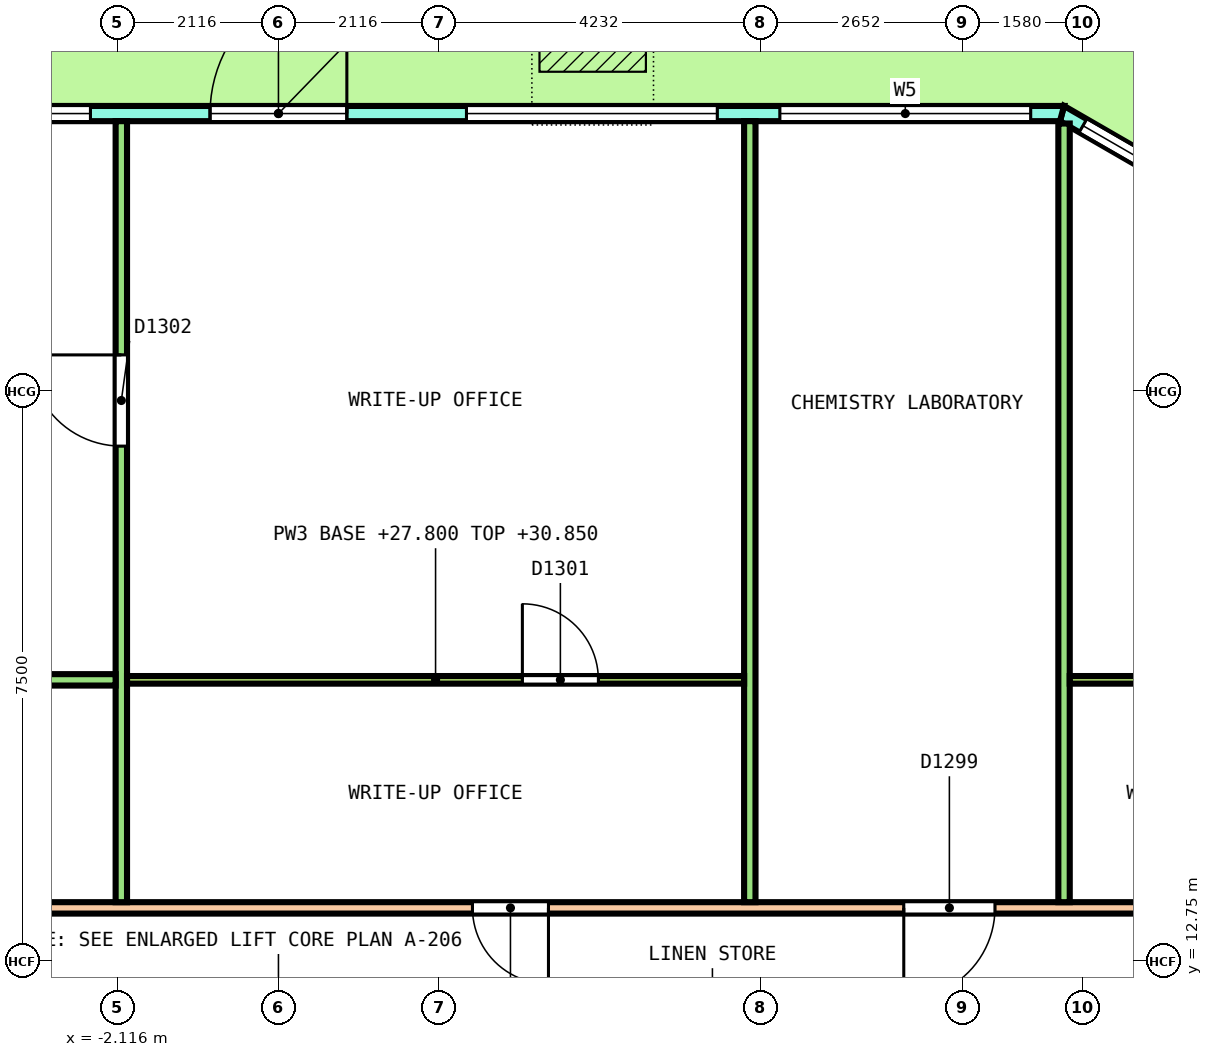
"""IFC4 building model, lengths in metres.
Left out: names, types, materials, properties, quantities, classifications, styles, units other than length and angle.
Written with IfcOpenShell. Run it as: python <this file> out.ifc"""

import sys

from ifc_helpers import new_model, si_unit, direction, frame, frame_2d, origin, place, context, subcontext, project, spatial, polyline, rectangle, outline, extrude, element, fill, save


model = new_model("IFC4")
c1 = context("Model", 3, precision=1e-05, world=origin(), true_north=direction((0.0, 1.0)))
c2 = subcontext(c1, "Body", "Model", "MODEL_VIEW")
j1 = project(units=[si_unit("LENGTHUNIT", "METRE"), si_unit("PLANEANGLEUNIT", "RADIAN")], contexts=[c1])
p1 = place(None, origin())
s1 = spatial("IfcSite", under=j1, at=p1, CompositionType="ELEMENT")
p2 = place(p1, origin())
s2 = spatial("IfcBuilding", under=s1, at=p2, CompositionType="ELEMENT")
p3 = place(p2, frame((0.0, 0.0, 27.8)))
s3 = spatial("IfcBuildingStorey", under=s2, at=p3, CompositionType="ELEMENT", Elevation=27.8)
p4 = place(p3, frame((16.262, 20.463, 0.0), z_axis=(0.0, 0.0, 1.0), x_axis=(-0.866029458321, 0.49999297727, 0.0)))
e1 = element("IfcWall", 1, at=p4, inside=s3, PredefinedType="SOLIDWALL", context=c2, shape_type="SweptSolid", body=[
    extrude(outline(polyline([(-0.027, -0.1), (1.128, -0.1), (2.282, -0.1), (3.437, -0.1), (4.592, -0.1), (5.747, -0.1), (6.901, -0.1), (6.848, 0.1), (5.711, 0.1), (4.574, 0.1), (3.437, 0.1), (2.301, 0.1), (1.164, 0.1), (0.027, 0.1), (-0.027, -0.1)])), origin(), (0.0, 0.0, 1.0), 4.1),
])
p5 = place(p4, frame((0.319, 0.0, 0.1)))
e2 = element("IfcOpeningElement", 2, at=p5, cuts=e1, PredefinedType="OPENING", context=c2, shape_type="SweptSolid", body=[
    extrude(rectangle(XDim=2.8, YDim=2.9, at=frame_2d((1.4, 1.45))), frame((0.0, 0.11, 0.0), z_axis=(0.0, -1.0, 0.0), x_axis=(1.0, 0.0, 0.0)), (0.0, 0.0, 1.0), 0.22),
])
p6 = place(p4, frame((3.756, 0.0, 0.1)))
e3 = element("IfcOpeningElement", 3, at=p6, cuts=e1, PredefinedType="OPENING", context=c2, shape_type="SweptSolid", body=[
    extrude(rectangle(XDim=2.8, YDim=2.9, at=frame_2d((1.4, 1.45))), frame((0.0, 0.11, 0.0), z_axis=(0.0, -1.0, 0.0), x_axis=(1.0, 0.0, 0.0)), (0.0, 0.0, 1.0), 0.22),
])
p7 = place(p3, frame((10.309, 23.9, 0.0), z_axis=(0.0, 0.0, 1.0), x_axis=(-1.0, 0.0, 0.0)))
e4 = element("IfcWall", 4, at=p7, inside=s3, PredefinedType="SOLIDWALL", context=c2, shape_type="SweptSolid", body=[
    extrude(outline(polyline([(-0.027, -0.1), (1.007, -0.1), (2.04, -0.1), (3.074, -0.1), (4.107, -0.1), (5.141, -0.1), (6.174, -0.1), (7.208, -0.1), (8.241, -0.1), (9.275, -0.1), (10.309, -0.1), (11.342, -0.1), (12.376, -0.1), (13.409, -0.1), (14.443, -0.1), (15.476, -0.1), (16.51, -0.1), (17.543, -0.1), (18.577, -0.1), (19.611, -0.1), (20.644, -0.1), (20.59, 0.1), (19.562, 0.1), (18.534, 0.1), (17.506, 0.1), (16.478, 0.1), (15.449, 0.1), (14.421, 0.1), (13.393, 0.1), (12.365, 0.1), (11.337, 0.1), (10.309, 0.1), (9.281, 0.1), (8.252, 0.1), (7.224, 0.1), (6.196, 0.1), (5.168, 0.1), (4.14, 0.1), (3.111, 0.1), (2.083, 0.1), (1.055, 0.1), (0.027, 0.1), (-0.027, -0.1)])), origin(), (0.0, 0.0, 1.0), 4.1),
])
p8 = place(p7, frame((0.412, 0.0, 0.1)))
e5 = element("IfcOpeningElement", 5, at=p8, cuts=e4, PredefinedType="OPENING", context=c2, shape_type="SweptSolid", body=[
    extrude(rectangle(XDim=3.3, YDim=2.9, at=frame_2d((1.65, 1.45))), frame((0.0, 0.11, 0.0), z_axis=(0.0, -1.0, 0.0), x_axis=(1.0, 0.0, 0.0)), (0.0, 0.0, 1.0), 0.22),
])
p9 = place(p7, frame((4.535, 0.0, 0.1)))
e6 = element("IfcOpeningElement", 6, at=p9, cuts=e4, PredefinedType="OPENING", context=c2, shape_type="SweptSolid", body=[
    extrude(rectangle(XDim=3.3, YDim=2.9, at=frame_2d((1.65, 1.45))), frame((0.0, 0.11, 0.0), z_axis=(0.0, -1.0, 0.0), x_axis=(1.0, 0.0, 0.0)), (0.0, 0.0, 1.0), 0.22),
])
p10 = place(p7, frame((9.409, 0.0, 0.0)))
e7 = element("IfcOpeningElement", 7, at=p10, cuts=e4, PredefinedType="OPENING", context=c2, shape_type="SweptSolid", body=[
    extrude(rectangle(XDim=1.8, YDim=2.4, at=frame_2d((0.9, 1.2))), frame((0.0, 0.11, 0.0), z_axis=(0.0, -1.0, 0.0), x_axis=(1.0, 0.0, 0.0)), (0.0, 0.0, 1.0), 0.22),
])
p11 = place(p7, frame((9.409, 0.0, 2.55)))
e8 = element("IfcOpeningElement", 8, at=p11, cuts=e4, PredefinedType="OPENING", context=c2, shape_type="SweptSolid", body=[
    extrude(rectangle(XDim=1.8, YDim=0.45, at=frame_2d((0.9, 0.225))), frame((0.0, 0.11, 0.0), z_axis=(0.0, -1.0, 0.0), x_axis=(1.0, 0.0, 0.0)), (0.0, 0.0, 1.0), 0.22),
])
p12 = place(p7, frame((12.782, 0.0, 0.1)))
e9 = element("IfcOpeningElement", 9, at=p12, cuts=e4, PredefinedType="OPENING", context=c2, shape_type="SweptSolid", body=[
    extrude(rectangle(XDim=3.3, YDim=2.9, at=frame_2d((1.65, 1.45))), frame((0.0, 0.11, 0.0), z_axis=(0.0, -1.0, 0.0), x_axis=(1.0, 0.0, 0.0)), (0.0, 0.0, 1.0), 0.22),
])
p13 = place(p7, frame((16.906, 0.0, 0.1)))
e10 = element("IfcOpeningElement", 10, at=p13, cuts=e4, PredefinedType="OPENING", context=c2, shape_type="SweptSolid", body=[
    extrude(rectangle(XDim=3.3, YDim=2.9, at=frame_2d((1.65, 1.45))), frame((0.0, 0.11, 0.0), z_axis=(0.0, -1.0, 0.0), x_axis=(1.0, 0.0, 0.0)), (0.0, 0.0, 1.0), 0.22),
])
p14 = place(p3, frame((-15.775, 13.45, 0.0), z_axis=(0.0, 0.0, 1.0), x_axis=(1.0, 0.0, 0.0)))
e11 = element("IfcWall", 11, at=p14, inside=s3, PredefinedType="PARTITIONING", context=c2, shape_type="SweptSolid", body=[
    extrude(rectangle(XDim=31.575, YDim=0.15, at=frame_2d((15.788, 0.0))), origin(), (0.0, 0.0, 1.0), 3.05),
])
p15 = place(p14, frame((28.368, 0.0, 0.0)))
e12 = element("IfcOpeningElement", 12, at=p15, cuts=e11, PredefinedType="OPENING", context=c2, shape_type="SweptSolid", body=[
    extrude(rectangle(XDim=1.0, YDim=2.1, at=frame_2d((0.5, 1.05))), frame((0.0, 0.085, 0.0), z_axis=(0.0, -1.0, 0.0), x_axis=(1.0, 0.0, 0.0)), (0.0, 0.0, 1.0), 0.17),
])
p16 = place(p14, frame((24.002, 0.0, 0.0)))
e13 = element("IfcOpeningElement", 13, at=p16, cuts=e11, PredefinedType="OPENING", context=c2, shape_type="SweptSolid", body=[
    extrude(rectangle(XDim=1.2, YDim=2.1, at=frame_2d((0.6, 1.05))), frame((0.0, 0.085, 0.0), z_axis=(0.0, -1.0, 0.0), x_axis=(1.0, 0.0, 0.0)), (0.0, 0.0, 1.0), 0.17),
])
p17 = place(p14, frame((18.327, 0.0, 0.0)))
e14 = element("IfcOpeningElement", 14, at=p17, cuts=e11, PredefinedType="OPENING", context=c2, shape_type="SweptSolid", body=[
    extrude(rectangle(XDim=1.0, YDim=2.1, at=frame_2d((0.5, 1.05))), frame((0.0, 0.085, 0.0), z_axis=(0.0, -1.0, 0.0), x_axis=(1.0, 0.0, 0.0)), (0.0, 0.0, 1.0), 0.17),
])
p18 = place(p14, frame((3.296, 0.0, 0.0)))
e15 = element("IfcOpeningElement", 15, at=p18, cuts=e11, PredefinedType="OPENING", context=c2, shape_type="SweptSolid", body=[
    extrude(rectangle(XDim=1.0, YDim=2.1, at=frame_2d((0.5, 1.05))), frame((0.0, 0.085, 0.0), z_axis=(0.0, -1.0, 0.0), x_axis=(1.0, 0.0, 0.0)), (0.0, 0.0, 1.0), 0.17),
])
p19 = place(p3, frame((10.335, 13.525, 0.0), z_axis=(0.0, 0.0, 1.0), x_axis=(0.0, 1.0, 0.0)))
e16 = element("IfcWall", 16, at=p19, inside=s3, PredefinedType="PARTITIONING", context=c2, shape_type="SweptSolid", body=[
    extrude(rectangle(XDim=10.244, YDim=0.15, at=frame_2d((5.122, 0.0))), origin(), (0.0, 0.0, 1.0), 3.05),
])
p20 = place(p3, frame((6.201, 13.525, 0.0), z_axis=(0.0, 0.0, 1.0), x_axis=(0.0, 1.0, 0.0)))
e17 = element("IfcWall", 17, at=p20, inside=s3, PredefinedType="PARTITIONING", context=c2, shape_type="SweptSolid", body=[
    extrude(rectangle(XDim=10.275, YDim=0.15, at=frame_2d((5.138, 0.0))), origin(), (0.0, 0.0, 1.0), 3.05),
])
p21 = place(p3, frame((-2.067, 13.525, 0.0), z_axis=(0.0, 0.0, 1.0), x_axis=(0.0, 1.0, 0.0)))
e18 = element("IfcWall", 18, at=p21, inside=s3, PredefinedType="PARTITIONING", context=c2, shape_type="SweptSolid", body=[
    extrude(rectangle(XDim=10.275, YDim=0.15, at=frame_2d((5.138, 0.0))), origin(), (0.0, 0.0, 1.0), 3.05),
])
p22 = place(p21, frame((6.0, 0.0, 0.0)))
e19 = element("IfcOpeningElement", 19, at=p22, cuts=e18, PredefinedType="OPENING", context=c2, shape_type="SweptSolid", body=[
    extrude(rectangle(XDim=1.2, YDim=2.1, at=frame_2d((0.6, 1.05))), frame((0.0, 0.085, 0.0), z_axis=(0.0, -1.0, 0.0), x_axis=(1.0, 0.0, 0.0)), (0.0, 0.0, 1.0), 0.17),
])
p23 = place(p3, frame((-18.463, 16.45, 0.0), z_axis=(0.0, 0.0, 1.0), x_axis=(1.0, 0.0, 0.0)))
e20 = element("IfcWall", 20, at=p23, inside=s3, PredefinedType="PARTITIONING", context=c2, shape_type="SweptSolid", body=[
    extrude(rectangle(XDim=16.321, YDim=0.15, at=frame_2d((8.161, 0.0))), origin(), (0.0, 0.0, 1.0), 3.05),
])
p24 = place(p3, frame((-1.992, 16.45, 0.0), z_axis=(0.0, 0.0, 1.0), x_axis=(1.0, 0.0, 0.0)))
e21 = element("IfcWall", 21, at=p24, inside=s3, PredefinedType="PARTITIONING", context=c2, shape_type="SweptSolid", body=[
    extrude(rectangle(XDim=8.118, YDim=0.1, at=frame_2d((4.059, 0.0))), origin(), (0.0, 0.0, 1.0), 3.05),
])
p25 = place(p24, frame((5.201, 0.0, 0.0)))
e22 = element("IfcOpeningElement", 22, at=p25, cuts=e21, PredefinedType="OPENING", context=c2, shape_type="SweptSolid", body=[
    extrude(rectangle(XDim=1.0, YDim=2.1, at=frame_2d((0.5, 1.05))), frame((0.0, 0.06, 0.0), z_axis=(0.0, -1.0, 0.0), x_axis=(1.0, 0.0, 0.0)), (0.0, 0.0, 1.0), 0.12),
])
p26 = place(p3, frame((10.41, 16.45, 0.0), z_axis=(0.0, 0.0, 1.0), x_axis=(1.0, 0.0, 0.0)))
e23 = element("IfcWall", 23, at=p26, inside=s3, PredefinedType="PARTITIONING", context=c2, shape_type="SweptSolid", body=[
    extrude(rectangle(XDim=7.364, YDim=0.1, at=frame_2d((3.682, 0.0))), origin(), (0.0, 0.0, 1.0), 3.05),
])
p27 = place(p26, frame((2.888, 0.0, 0.0)))
e24 = element("IfcOpeningElement", 24, at=p27, cuts=e23, PredefinedType="OPENING", context=c2, shape_type="SweptSolid", body=[
    extrude(rectangle(XDim=1.0, YDim=2.1, at=frame_2d((0.5, 1.05))), frame((0.0, 0.06, 0.0), z_axis=(0.0, -1.0, 0.0), x_axis=(1.0, 0.0, 0.0)), (0.0, 0.0, 1.0), 0.12),
])
p28 = place(p6, origin())
e25 = element("IfcWindow", 25, at=p28, inside=s3, PartitioningType="SINGLE_PANEL", PredefinedType="WINDOW", context=c2, shape_type="SweptSolid", body=[
    extrude(rectangle(XDim=2.8, YDim=2.9, at=frame_2d((1.4, 1.45))), frame((0.0, 0.03, 0.0), z_axis=(0.0, -1.0, 0.0), x_axis=(1.0, 0.0, 0.0)), (0.0, 0.0, 1.0), 0.06),
])
fill(e3, e25)
p29 = place(p8, origin())
e26 = element("IfcWindow", 26, at=p29, inside=s3, PartitioningType="SINGLE_PANEL", PredefinedType="WINDOW", context=c2, shape_type="SweptSolid", body=[
    extrude(rectangle(XDim=3.3, YDim=2.9, at=frame_2d((1.65, 1.45))), frame((0.0, 0.03, 0.0), z_axis=(0.0, -1.0, 0.0), x_axis=(1.0, 0.0, 0.0)), (0.0, 0.0, 1.0), 0.06),
])
fill(e5, e26)
p30 = place(p9, origin())
e27 = element("IfcWindow", 27, at=p30, inside=s3, PartitioningType="SINGLE_PANEL", PredefinedType="WINDOW", context=c2, shape_type="SweptSolid", body=[
    extrude(rectangle(XDim=3.3, YDim=2.9, at=frame_2d((1.65, 1.45))), frame((0.0, 0.03, 0.0), z_axis=(0.0, -1.0, 0.0), x_axis=(1.0, 0.0, 0.0)), (0.0, 0.0, 1.0), 0.06),
])
fill(e6, e27)
p31 = place(p10, origin())
e28 = element("IfcDoor", 28, at=p31, inside=s3, OperationType="DOUBLE_DOOR_SINGLE_SWING", PredefinedType="DOOR", context=c2, shape_type="SweptSolid", body=[
    extrude(rectangle(XDim=1.8, YDim=2.4, at=frame_2d((0.9, 1.2))), frame((0.0, 0.025, 0.0), z_axis=(0.0, -1.0, 0.0), x_axis=(1.0, 0.0, 0.0)), (0.0, 0.0, 1.0), 0.05),
])
fill(e7, e28)
p32 = place(p11, origin())
e29 = element("IfcWindow", 29, at=p32, inside=s3, PartitioningType="SINGLE_PANEL", PredefinedType="WINDOW", context=c2, shape_type="SweptSolid", body=[
    extrude(rectangle(XDim=1.8, YDim=0.45, at=frame_2d((0.9, 0.225))), frame((0.0, 0.03, 0.0), z_axis=(0.0, -1.0, 0.0), x_axis=(1.0, 0.0, 0.0)), (0.0, 0.0, 1.0), 0.06),
])
fill(e8, e29)
p33 = place(p12, origin())
e30 = element("IfcWindow", 30, at=p33, inside=s3, PartitioningType="SINGLE_PANEL", PredefinedType="WINDOW", context=c2, shape_type="SweptSolid", body=[
    extrude(rectangle(XDim=3.3, YDim=2.9, at=frame_2d((1.65, 1.45))), frame((0.0, 0.03, 0.0), z_axis=(0.0, -1.0, 0.0), x_axis=(1.0, 0.0, 0.0)), (0.0, 0.0, 1.0), 0.06),
])
fill(e9, e30)
p34 = place(p16, origin())
e31 = element("IfcDoor", 31, at=p34, inside=s3, OperationType="DOUBLE_DOOR_SINGLE_SWING", PredefinedType="DOOR", context=c2, shape_type="SweptSolid", body=[
    extrude(rectangle(XDim=1.2, YDim=2.1, at=frame_2d((0.6, 1.05))), frame((0.0, 0.025, 0.0), z_axis=(0.0, -1.0, 0.0), x_axis=(1.0, 0.0, 0.0)), (0.0, 0.0, 1.0), 0.05),
])
fill(e13, e31)
p35 = place(p17, origin())
e32 = element("IfcDoor", 32, at=p35, inside=s3, OperationType="SINGLE_SWING_RIGHT", PredefinedType="DOOR", context=c2, shape_type="SweptSolid", body=[
    extrude(rectangle(XDim=1.0, YDim=2.1, at=frame_2d((0.5, 1.05))), frame((0.0, 0.025, 0.0), z_axis=(0.0, -1.0, 0.0), x_axis=(1.0, 0.0, 0.0)), (0.0, 0.0, 1.0), 0.05),
])
fill(e14, e32)
p36 = place(p25, origin())
e33 = element("IfcDoor", 33, at=p36, inside=s3, OperationType="SINGLE_SWING_LEFT", PredefinedType="DOOR", context=c2, shape_type="SweptSolid", body=[
    extrude(rectangle(XDim=1.0, YDim=2.1, at=frame_2d((0.5, 1.05))), frame((0.0, 0.025, 0.0), z_axis=(0.0, -1.0, 0.0), x_axis=(1.0, 0.0, 0.0)), (0.0, 0.0, 1.0), 0.05),
])
fill(e22, e33)
p37 = place(p22, origin())
e34 = element("IfcDoor", 34, at=p37, inside=s3, OperationType="DOUBLE_DOOR_SINGLE_SWING", PredefinedType="DOOR", context=c2, shape_type="SweptSolid", body=[
    extrude(rectangle(XDim=1.2, YDim=2.1, at=frame_2d((0.6, 1.05))), frame((0.0, 0.025, 0.0), z_axis=(0.0, -1.0, 0.0), x_axis=(1.0, 0.0, 0.0)), (0.0, 0.0, 1.0), 0.05),
])
fill(e19, e34)
save(model, sys.argv[1])
